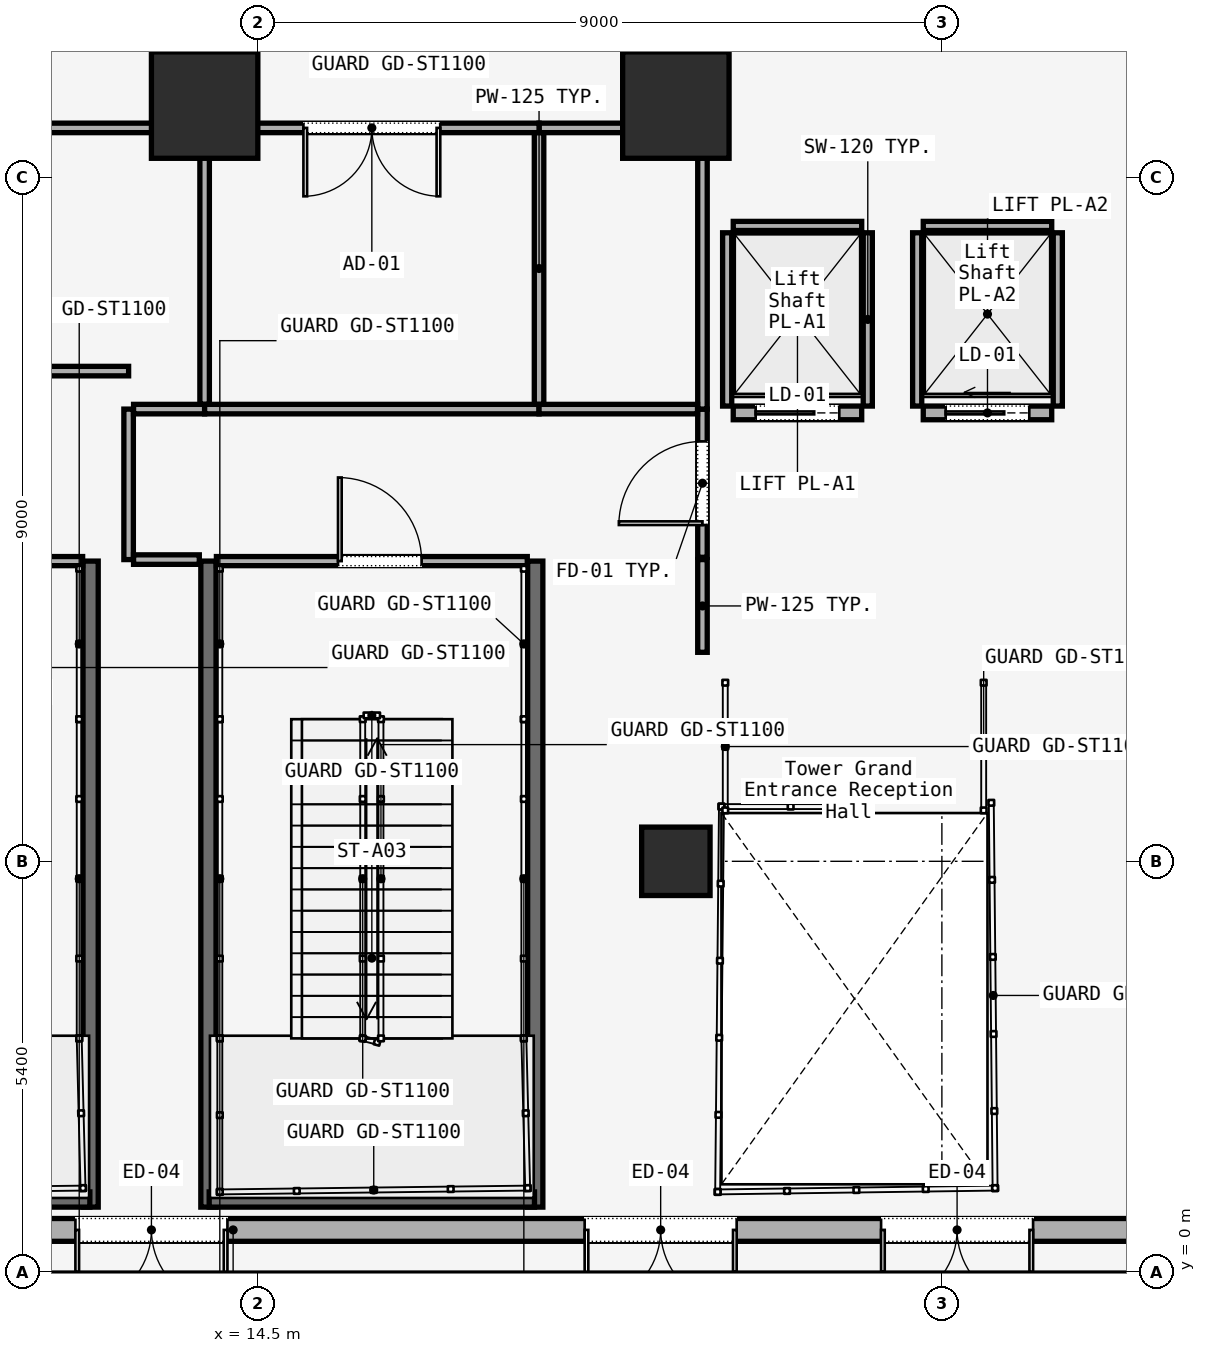
"""IFC4 building model, lengths in metres.
Left out: names, types, materials, properties, quantities, classifications, styles, units other than length and angle.
Written with IfcOpenShell. Run it as: python <this file> out.ifc"""

import sys

from ifc_helpers import new_model, si_unit, direction, frame, frame_2d, origin, origin_2d, place, context, subcontext, project, spatial, rectangle, extrude, element, fill, save


model = new_model("IFC4")
c1 = context("Model", 3, precision=1e-05, world=origin(), true_north=direction((0.0, 1.0)))
c2 = subcontext(c1, "Body", "Model", "MODEL_VIEW")
j1 = project(units=[si_unit("LENGTHUNIT", "METRE"), si_unit("PLANEANGLEUNIT", "RADIAN")], contexts=[c1])
p1 = place(None, origin())
s1 = spatial("IfcSite", under=j1, at=p1, CompositionType="ELEMENT")
p2 = place(p1, origin())
s2 = spatial("IfcBuilding", under=s1, at=p2, CompositionType="ELEMENT")
p3 = place(p2, origin())
s3 = spatial("IfcBuildingStorey", under=s2, at=p3, CompositionType="ELEMENT", Elevation=0.0)
for number, where, z_axis, x_axis in (
    (1, (13.8, 15.35, 0.0), (0.0, 0.0, 1.0), (1.0, 0.0, 0.0)),
    (2, (20.0, 15.35, 0.0), (0.0, 0.0, 1.0), (1.0, 0.0, 0.0)),
):
    element("IfcColumn", number, at=place(p3, frame(where, z_axis=z_axis, x_axis=x_axis)), inside=s3, PredefinedType="COLUMN", context=c2, shape_type="SweptSolid", body=[
        extrude(rectangle(XDim=1.4, YDim=1.4, at=origin_2d()), origin(), (0.0, 0.0, 1.0), 5.7),
    ])
p4 = place(p3, frame((20.0, 5.4, 0.0), z_axis=(0.0, 0.0, 1.0), x_axis=(1.0, 0.0, 0.0)))
e3 = element("IfcColumn", 3, at=p4, inside=s3, PredefinedType="COLUMN", context=c2, shape_type="SweptSolid", body=[
    extrude(rectangle(XDim=0.9, YDim=0.9, at=origin_2d()), origin(), (0.0, 0.0, 1.0), 5.7),
])
p5 = place(p3, frame((26.05, 0.55, 0.0), z_axis=(0.0, 0.0, 1.0), x_axis=(-1.0, 0.0, 0.0)))
e4 = element("IfcWall", 4, at=p5, inside=s3, PredefinedType="SOLIDWALL", context=c2, shape_type="SweptSolid", body=[
    extrude(rectangle(XDim=23.75, YDim=0.3, at=frame_2d((11.875, 0.0))), origin(), (0.0, 0.0, 1.0), 5.7),
])
p6 = place(p5, frame((5.25, 0.0, 0.0)))
e5 = element("IfcOpeningElement", 5, at=p6, cuts=e4, PredefinedType="OPENING", context=c2, shape_type="SweptSolid", body=[
    extrude(rectangle(XDim=2.0, YDim=2.3, at=frame_2d((1.0, 1.15))), frame((0.0, 0.15, 0.0), z_axis=(0.0, -1.0, 0.0), x_axis=(1.0, 0.0, 0.0)), (0.0, 0.0, 1.0), 0.3),
])
p7 = place(p5, frame((1.35, 0.0, 0.0)))
e6 = element("IfcOpeningElement", 6, at=p7, cuts=e4, PredefinedType="OPENING", context=c2, shape_type="SweptSolid", body=[
    extrude(rectangle(XDim=2.0, YDim=2.3, at=frame_2d((1.0, 1.15))), frame((0.0, 0.15, 0.0), z_axis=(0.0, -1.0, 0.0), x_axis=(1.0, 0.0, 0.0)), (0.0, 0.0, 1.0), 0.3),
])
p8 = place(p5, frame((11.95, 0.0, 0.0)))
e7 = element("IfcOpeningElement", 7, at=p8, cuts=e4, PredefinedType="OPENING", context=c2, shape_type="SweptSolid", body=[
    extrude(rectangle(XDim=2.0, YDim=2.3, at=frame_2d((1.0, 1.15))), frame((0.0, 0.15, 0.0), z_axis=(0.0, -1.0, 0.0), x_axis=(1.0, 0.0, 0.0)), (0.0, 0.0, 1.0), 0.3),
])
p9 = place(p3, frame((12.3, 9.35, -0.4), z_axis=(0.0, 0.0, 1.0), x_axis=(0.0, -1.0, 0.0)))
e8 = element("IfcWall", 8, at=p9, inside=s3, PredefinedType="SOLIDWALL", context=c2, shape_type="SweptSolid", body=[
    extrude(rectangle(XDim=8.5, YDim=0.2, at=frame_2d((4.25, 0.0))), origin(), (0.0, 0.0, 1.0), 6.4),
])
p10 = place(p3, frame((8.01, 0.95, -0.4), z_axis=(0.0, 0.0, 1.0), x_axis=(1.0, 0.0, 0.0)))
e9 = element("IfcWall", 9, at=p10, inside=s3, PredefinedType="SOLIDWALL", context=c2, shape_type="SweptSolid", body=[
    extrude(rectangle(XDim=4.28, YDim=0.2, at=frame_2d((2.14, 0.0))), origin(), (0.0, 0.0, 1.0), 6.4),
])
p11 = place(p3, frame((8.105, 9.35, 0.0), z_axis=(0.0, 0.0, 1.0), x_axis=(1.0, 0.0, 0.0)))
e10 = element("IfcWall", 10, at=p11, inside=s3, PredefinedType="SOLIDWALL", context=c2, shape_type="SweptSolid", body=[
    extrude(rectangle(XDim=4.09, YDim=0.12, at=frame_2d((2.045, 0.0))), origin(), (0.0, 0.0, 1.0), 3.6),
])
p12 = place(p11, frame((1.6, 0.0, 0.0)))
e11 = element("IfcOpeningElement", 11, at=p12, cuts=e10, PredefinedType="OPENING", context=c2, shape_type="SweptSolid", body=[
    extrude(rectangle(XDim=1.1, YDim=2.2, at=frame_2d((0.55, 1.1))), frame((0.0, 0.06, 0.0), z_axis=(0.0, -1.0, 0.0), x_axis=(1.0, 0.0, 0.0)), (0.0, 0.0, 1.0), 0.12),
])
for number, where, z_axis, x_axis in (
    (12, (13.85, 9.35, -0.4), (0.0, 0.0, 1.0), (0.0, -1.0, 0.0)),
    (13, (18.15, 9.35, -0.4), (0.0, 0.0, 1.0), (0.0, -1.0, 0.0)),
):
    element("IfcWall", number, at=place(p3, frame(where, z_axis=z_axis, x_axis=x_axis)), inside=s3, PredefinedType="SOLIDWALL", context=c2, shape_type="SweptSolid", body=[
        extrude(rectangle(XDim=8.5, YDim=0.2, at=frame_2d((4.25, 0.0))), origin(), (0.0, 0.0, 1.0), 6.4),
    ])
p13 = place(p3, frame((13.86, 0.95, -0.4), z_axis=(0.0, 0.0, 1.0), x_axis=(1.0, 0.0, 0.0)))
e14 = element("IfcWall", 14, at=p13, inside=s3, PredefinedType="SOLIDWALL", context=c2, shape_type="SweptSolid", body=[
    extrude(rectangle(XDim=4.28, YDim=0.2, at=frame_2d((2.14, 0.0))), origin(), (0.0, 0.0, 1.0), 6.4),
])
p14 = place(p3, frame((13.955, 9.35, 0.0), z_axis=(0.0, 0.0, 1.0), x_axis=(1.0, 0.0, 0.0)))
e15 = element("IfcWall", 15, at=p14, inside=s3, PredefinedType="SOLIDWALL", context=c2, shape_type="SweptSolid", body=[
    extrude(rectangle(XDim=4.09, YDim=0.12, at=frame_2d((2.045, 0.0))), origin(), (0.0, 0.0, 1.0), 3.6),
])
p15 = place(p14, frame((1.6, 0.0, 0.0)))
e16 = element("IfcOpeningElement", 16, at=p15, cuts=e15, PredefinedType="OPENING", context=c2, shape_type="SweptSolid", body=[
    extrude(rectangle(XDim=1.1, YDim=2.2, at=frame_2d((0.55, 1.1))), frame((0.0, 0.06, 0.0), z_axis=(0.0, -1.0, 0.0), x_axis=(1.0, 0.0, 0.0)), (0.0, 0.0, 1.0), 0.12),
])
p16 = place(p3, frame((20.755, 11.3, 0.0), z_axis=(0.0, 0.0, 1.0), x_axis=(1.0, 0.0, 0.0)))
e17 = element("IfcWall", 17, at=p16, inside=s3, PredefinedType="SOLIDWALL", context=c2, shape_type="SweptSolid", body=[
    extrude(rectangle(XDim=1.69, YDim=0.18, at=frame_2d((0.845, 0.0))), origin(), (0.0, 0.0, 1.0), 3.6),
])
p17 = place(p16, frame((0.295, 0.0, 0.0)))
e18 = element("IfcOpeningElement", 18, at=p17, cuts=e17, PredefinedType="OPENING", context=c2, shape_type="SweptSolid", body=[
    extrude(rectangle(XDim=1.1, YDim=2.2, at=frame_2d((0.55, 1.1))), frame((0.0, 0.09, 0.0), z_axis=(0.0, -1.0, 0.0), x_axis=(1.0, 0.0, 0.0)), (0.0, 0.0, 1.0), 0.18),
])
p18 = place(p3, frame((20.755, 13.76, 0.0), z_axis=(0.0, 0.0, 1.0), x_axis=(1.0, 0.0, 0.0)))
e19 = element("IfcWall", 19, at=p18, inside=s3, PredefinedType="SOLIDWALL", context=c2, shape_type="SweptSolid", body=[
    extrude(rectangle(XDim=1.69, YDim=0.12, at=frame_2d((0.845, 0.0))), origin(), (0.0, 0.0, 1.0), 3.6),
])
for number, where, z_axis, x_axis in (
    (20, (20.675, 11.39, 0.0), (0.0, 0.0, 1.0), (0.0, 1.0, 0.0)),
    (21, (22.525, 11.39, 0.0), (0.0, 0.0, 1.0), (0.0, 1.0, 0.0)),
):
    element("IfcWall", number, at=place(p3, frame(where, z_axis=z_axis, x_axis=x_axis)), inside=s3, PredefinedType="SOLIDWALL", context=c2, shape_type="SweptSolid", body=[
        extrude(rectangle(XDim=2.28, YDim=0.12, at=frame_2d((1.14, 0.0))), origin(), (0.0, 0.0, 1.0), 3.6),
    ])
p19 = place(p3, frame((23.255, 11.3, 0.0), z_axis=(0.0, 0.0, 1.0), x_axis=(1.0, 0.0, 0.0)))
e22 = element("IfcWall", 22, at=p19, inside=s3, PredefinedType="SOLIDWALL", context=c2, shape_type="SweptSolid", body=[
    extrude(rectangle(XDim=1.69, YDim=0.18, at=frame_2d((0.845, 0.0))), origin(), (0.0, 0.0, 1.0), 3.6),
])
p20 = place(p19, frame((0.295, 0.0, 0.0)))
e23 = element("IfcOpeningElement", 23, at=p20, cuts=e22, PredefinedType="OPENING", context=c2, shape_type="SweptSolid", body=[
    extrude(rectangle(XDim=1.1, YDim=2.2, at=frame_2d((0.55, 1.1))), frame((0.0, 0.09, 0.0), z_axis=(0.0, -1.0, 0.0), x_axis=(1.0, 0.0, 0.0)), (0.0, 0.0, 1.0), 0.18),
])
p21 = place(p3, frame((23.255, 13.76, 0.0), z_axis=(0.0, 0.0, 1.0), x_axis=(1.0, 0.0, 0.0)))
e24 = element("IfcWall", 24, at=p21, inside=s3, PredefinedType="SOLIDWALL", context=c2, shape_type="SweptSolid", body=[
    extrude(rectangle(XDim=1.69, YDim=0.12, at=frame_2d((0.845, 0.0))), origin(), (0.0, 0.0, 1.0), 3.6),
])
for number, where, z_axis, x_axis in (
    (25, (23.175, 11.39, 0.0), (0.0, 0.0, 1.0), (0.0, 1.0, 0.0)),
    (26, (25.025, 11.39, 0.0), (0.0, 0.0, 1.0), (0.0, 1.0, 0.0)),
):
    element("IfcWall", number, at=place(p3, frame(where, z_axis=z_axis, x_axis=x_axis)), inside=s3, PredefinedType="SOLIDWALL", context=c2, shape_type="SweptSolid", body=[
        extrude(rectangle(XDim=2.28, YDim=0.12, at=frame_2d((1.14, 0.0))), origin(), (0.0, 0.0, 1.0), 3.6),
    ])
p22 = place(p3, frame((20.35, 8.15, 0.0), z_axis=(0.0, 0.0, 1.0), x_axis=(0.0, 1.0, 0.0)))
e27 = element("IfcWall", 27, at=p22, inside=s3, PredefinedType="PARTITIONING", context=c2, shape_type="SweptSolid", body=[
    extrude(rectangle(XDim=1.22, YDim=0.125, at=frame_2d((0.61, 0.0))), origin(), (0.0, 0.0, 1.0), 3.6),
])
p23 = place(p3, frame((20.35, 9.4, 0.0), z_axis=(0.0, 0.0, 1.0), x_axis=(0.0, 1.0, 0.0)))
e28 = element("IfcWall", 28, at=p23, inside=s3, PredefinedType="PARTITIONING", context=c2, shape_type="SweptSolid", body=[
    extrude(rectangle(XDim=1.95, YDim=0.125, at=frame_2d((0.975, 0.0))), origin(), (0.0, 0.0, 1.0), 3.6),
])
p24 = place(p23, frame((0.425, 0.0, 0.0)))
e29 = element("IfcOpeningElement", 29, at=p24, cuts=e28, PredefinedType="OPENING", context=c2, shape_type="SweptSolid", body=[
    extrude(rectangle(XDim=1.1, YDim=2.2, at=frame_2d((0.55, 1.1))), frame((0.0, 0.062, 0.0), z_axis=(0.0, -1.0, 0.0), x_axis=(1.0, 0.0, 0.0)), (0.0, 0.0, 1.0), 0.125),
])
p25 = place(p3, frame((20.35, 11.35, 0.0), z_axis=(0.0, 0.0, 1.0), x_axis=(0.0, 1.0, 0.0)))
e30 = element("IfcWall", 30, at=p25, inside=s3, PredefinedType="PARTITIONING", context=c2, shape_type="SweptSolid", body=[
    extrude(rectangle(XDim=3.7, YDim=0.125, at=frame_2d((1.85, 0.0))), origin(), (0.0, 0.0, 1.0), 3.6),
])
p26 = place(p3, frame((20.285, 15.05, 0.0), z_axis=(0.0, 0.0, 1.0), x_axis=(-1.0, 0.0, 0.0)))
e31 = element("IfcWall", 31, at=p26, inside=s3, PredefinedType="PARTITIONING", context=c2, shape_type="SweptSolid", body=[
    extrude(rectangle(XDim=2.085, YDim=0.125, at=frame_2d((1.042, 0.0))), origin(), (0.0, 0.0, 1.0), 3.6),
])
p27 = place(p3, frame((18.2, 15.05, 0.0), z_axis=(0.0, 0.0, 1.0), x_axis=(-1.0, 0.0, 0.0)))
e32 = element("IfcWall", 32, at=p27, inside=s3, PredefinedType="PARTITIONING", context=c2, shape_type="SweptSolid", body=[
    extrude(rectangle(XDim=4.4, YDim=0.125, at=frame_2d((2.2, 0.0))), origin(), (0.0, 0.0, 1.0), 3.6),
])
p28 = place(p27, frame((1.3, 0.0, 0.0)))
e33 = element("IfcOpeningElement", 33, at=p28, cuts=e32, PredefinedType="OPENING", context=c2, shape_type="SweptSolid", body=[
    extrude(rectangle(XDim=1.8, YDim=2.3, at=frame_2d((0.9, 1.15))), frame((0.0, 0.062, 0.0), z_axis=(0.0, -1.0, 0.0), x_axis=(1.0, 0.0, 0.0)), (0.0, 0.0, 1.0), 0.125),
])
p29 = place(p3, frame((13.8, 15.05, 0.0), z_axis=(0.0, 0.0, 1.0), x_axis=(-1.0, 0.0, 0.0)))
e34 = element("IfcWall", 34, at=p29, inside=s3, PredefinedType="PARTITIONING", context=c2, shape_type="SweptSolid", body=[
    extrude(rectangle(XDim=2.65, YDim=0.125, at=frame_2d((1.325, 0.0))), origin(), (0.0, 0.0, 1.0), 3.6),
])
p30 = place(p3, frame((2.05, 11.85, 0.0), z_axis=(0.0, 0.0, 1.0), x_axis=(1.0, 0.0, 0.0)))
e35 = element("IfcWall", 35, at=p30, inside=s3, PredefinedType="PARTITIONING", context=c2, shape_type="SweptSolid", body=[
    extrude(rectangle(XDim=10.75, YDim=0.125, at=frame_2d((5.375, 0.0))), origin(), (0.0, 0.0, 1.0), 3.6),
])
p31 = place(p3, frame((12.8, 11.35, 0.0), z_axis=(0.0, 0.0, 1.0), x_axis=(0.0, -1.0, 0.0)))
e36 = element("IfcWall", 36, at=p31, inside=s3, PredefinedType="PARTITIONING", context=c2, shape_type="SweptSolid", body=[
    extrude(rectangle(XDim=1.98, YDim=0.125, at=frame_2d((0.99, 0.0))), origin(), (0.0, 0.0, 1.0), 3.6),
])
p32 = place(p3, frame((13.73, 9.37, 0.0), z_axis=(0.0, 0.0, 1.0), x_axis=(-1.0, 0.0, 0.0)))
e37 = element("IfcWall", 37, at=p32, inside=s3, PredefinedType="PARTITIONING", context=c2, shape_type="SweptSolid", body=[
    extrude(rectangle(XDim=0.865, YDim=0.125, at=frame_2d((0.433, 0.0))), origin(), (0.0, 0.0, 1.0), 3.6),
])
p33 = place(p3, frame((12.865, 11.35, 0.0), z_axis=(0.0, 0.0, 1.0), x_axis=(1.0, 0.0, 0.0)))
e38 = element("IfcWall", 38, at=p33, inside=s3, PredefinedType="PARTITIONING", context=c2, shape_type="SweptSolid", body=[
    extrude(rectangle(XDim=0.935, YDim=0.125, at=frame_2d((0.468, 0.0))), origin(), (0.0, 0.0, 1.0), 3.6),
])
p34 = place(p3, frame((13.8, 11.35, 0.0), z_axis=(0.0, 0.0, 1.0), x_axis=(1.0, 0.0, 0.0)))
e39 = element("IfcWall", 39, at=p34, inside=s3, PredefinedType="PARTITIONING", context=c2, shape_type="SweptSolid", body=[
    extrude(rectangle(XDim=4.4, YDim=0.125, at=frame_2d((2.2, 0.0))), origin(), (0.0, 0.0, 1.0), 3.6),
])
p35 = place(p3, frame((18.2, 11.35, 0.0), z_axis=(0.0, 0.0, 1.0), x_axis=(1.0, 0.0, 0.0)))
e40 = element("IfcWall", 40, at=p35, inside=s3, PredefinedType="PARTITIONING", context=c2, shape_type="SweptSolid", body=[
    extrude(rectangle(XDim=2.085, YDim=0.125, at=frame_2d((1.042, 0.0))), origin(), (0.0, 0.0, 1.0), 3.6),
])
for number, where, z_axis, x_axis in (
    (41, (13.8, 11.415, 0.0), (0.0, 0.0, 1.0), (0.0, 1.0, 0.0)),
    (42, (18.2, 14.985, 0.0), (0.0, 0.0, 1.0), (0.0, -1.0, 0.0)),
):
    element("IfcWall", number, at=place(p3, frame(where, z_axis=z_axis, x_axis=x_axis)), inside=s3, PredefinedType="PARTITIONING", context=c2, shape_type="SweptSolid", body=[
        extrude(rectangle(XDim=3.57, YDim=0.125, at=frame_2d((1.785, 0.0))), origin(), (0.0, 0.0, 1.0), 3.6),
    ])
p36 = place(p6, origin())
e43 = element("IfcDoor", 43, at=p36, inside=s3, OperationType="DOUBLE_DOOR_SINGLE_SWING", PredefinedType="DOOR", context=c2, shape_type="SweptSolid", body=[
    extrude(rectangle(XDim=2.0, YDim=2.3, at=frame_2d((1.0, 1.15))), frame((0.0, 0.025, 0.0), z_axis=(0.0, -1.0, 0.0), x_axis=(1.0, 0.0, 0.0)), (0.0, 0.0, 1.0), 0.05),
])
fill(e5, e43)
p37 = place(p7, origin())
e44 = element("IfcDoor", 44, at=p37, inside=s3, OperationType="DOUBLE_DOOR_SINGLE_SWING", PredefinedType="DOOR", context=c2, shape_type="SweptSolid", body=[
    extrude(rectangle(XDim=2.0, YDim=2.3, at=frame_2d((1.0, 1.15))), frame((0.0, 0.025, 0.0), z_axis=(0.0, -1.0, 0.0), x_axis=(1.0, 0.0, 0.0)), (0.0, 0.0, 1.0), 0.05),
])
fill(e6, e44)
p38 = place(p8, origin())
e45 = element("IfcDoor", 45, at=p38, inside=s3, OperationType="DOUBLE_DOOR_SINGLE_SWING", PredefinedType="DOOR", context=c2, shape_type="SweptSolid", body=[
    extrude(rectangle(XDim=2.0, YDim=2.3, at=frame_2d((1.0, 1.15))), frame((0.0, 0.025, 0.0), z_axis=(0.0, -1.0, 0.0), x_axis=(1.0, 0.0, 0.0)), (0.0, 0.0, 1.0), 0.05),
])
fill(e7, e45)
p39 = place(p15, origin())
e46 = element("IfcDoor", 46, at=p39, inside=s3, OperationType="SINGLE_SWING_LEFT", PredefinedType="DOOR", context=c2, shape_type="SweptSolid", body=[
    extrude(rectangle(XDim=1.1, YDim=2.2, at=frame_2d((0.55, 1.1))), frame((0.0, 0.025, 0.0), z_axis=(0.0, -1.0, 0.0), x_axis=(1.0, 0.0, 0.0)), (0.0, 0.0, 1.0), 0.05),
])
fill(e16, e46)
p40 = place(p17, origin())
e47 = element("IfcDoor", 47, at=p40, inside=s3, OperationType="SLIDING_TO_LEFT", PredefinedType="DOOR", context=c2, shape_type="SweptSolid", body=[
    extrude(rectangle(XDim=1.1, YDim=2.2, at=frame_2d((0.55, 1.1))), frame((0.0, 0.025, 0.0), z_axis=(0.0, -1.0, 0.0), x_axis=(1.0, 0.0, 0.0)), (0.0, 0.0, 1.0), 0.05),
])
fill(e18, e47)
p41 = place(p20, origin())
e48 = element("IfcDoor", 48, at=p41, inside=s3, OperationType="SLIDING_TO_LEFT", PredefinedType="DOOR", context=c2, shape_type="SweptSolid", body=[
    extrude(rectangle(XDim=1.1, YDim=2.2, at=frame_2d((0.55, 1.1))), frame((0.0, 0.025, 0.0), z_axis=(0.0, -1.0, 0.0), x_axis=(1.0, 0.0, 0.0)), (0.0, 0.0, 1.0), 0.05),
])
fill(e23, e48)
p42 = place(p24, origin())
e49 = element("IfcDoor", 49, at=p42, inside=s3, OperationType="SINGLE_SWING_RIGHT", PredefinedType="DOOR", context=c2, shape_type="SweptSolid", body=[
    extrude(rectangle(XDim=1.1, YDim=2.2, at=frame_2d((0.55, 1.1))), frame((0.0, 0.025, 0.0), z_axis=(0.0, -1.0, 0.0), x_axis=(1.0, 0.0, 0.0)), (0.0, 0.0, 1.0), 0.05),
])
fill(e29, e49)
p43 = place(p28, origin())
e50 = element("IfcDoor", 50, at=p43, inside=s3, OperationType="SINGLE_SWING_RIGHT", PredefinedType="DOOR", context=c2, shape_type="SweptSolid", body=[
    extrude(rectangle(XDim=1.8, YDim=2.3, at=frame_2d((0.9, 1.15))), frame((0.0, 0.025, 0.0), z_axis=(0.0, -1.0, 0.0), x_axis=(1.0, 0.0, 0.0)), (0.0, 0.0, 1.0), 0.05),
])
fill(e33, e50)
save(model, sys.argv[1])
